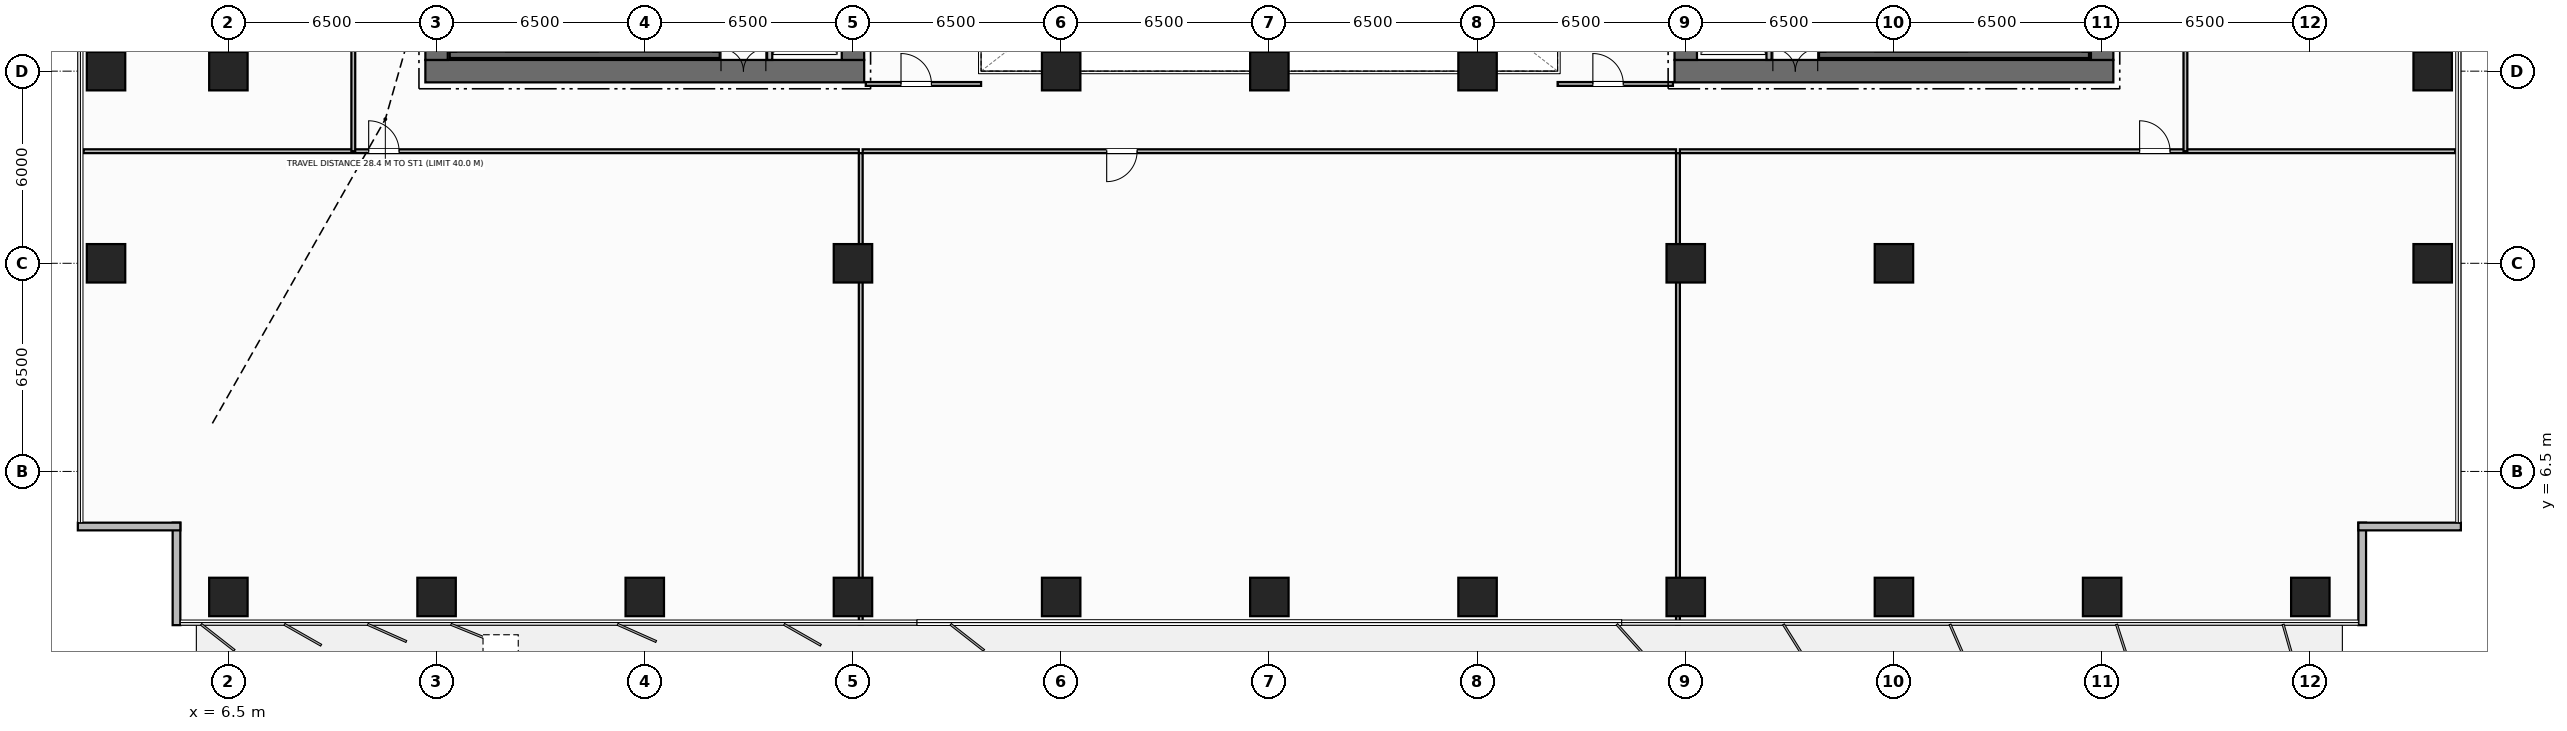
"""IFC4 building model, lengths in metres.
Left out: names, types, materials, properties, quantities, classifications, styles, units other than length and angle.
Written with IfcOpenShell. Run it as: python <this file> out.ifc"""

import sys

from ifc_helpers import new_model, si_unit, direction, frame, frame_2d, origin, origin_2d, place, context, subcontext, project, spatial, rectangle, extrude, element, fill, save


model = new_model("IFC4")
c1 = context("Model", 3, precision=1e-05, world=origin(), true_north=direction((0.0, 1.0)))
c2 = subcontext(c1, "Body", "Model", "MODEL_VIEW")
j1 = project(units=[si_unit("LENGTHUNIT", "METRE"), si_unit("PLANEANGLEUNIT", "RADIAN")], contexts=[c1])
p1 = place(None, origin())
s1 = spatial("IfcSite", under=j1, at=p1, CompositionType="ELEMENT")
p2 = place(p1, origin())
s2 = spatial("IfcBuilding", under=s1, at=p2, CompositionType="ELEMENT")
p3 = place(p2, frame((0.0, 0.0, 86.0)))
s3 = spatial("IfcBuildingStorey", under=s2, at=p3, CompositionType="ELEMENT", Elevation=86.0)
p4 = place(p3, frame((12.65, 19.0, 0.0), z_axis=(0.0, 0.0, 1.0), x_axis=(1.0, 0.0, 0.0)))
e1 = element("IfcWall", 1, at=p4, inside=s3, PredefinedType="SHEAR", context=c2, shape_type="SweptSolid", body=[
    extrude(rectangle(XDim=13.7, YDim=0.7, at=frame_2d((6.85, 0.0))), origin(), (0.0, 0.0, 1.0), 3.8),
])
p5 = place(p4, frame((9.23, 0.0, 0.0)))
e2 = element("IfcOpeningElement", 2, at=p5, cuts=e1, PredefinedType="OPENING", context=c2, shape_type="SweptSolid", body=[
    extrude(rectangle(XDim=1.4, YDim=2.2, at=frame_2d((0.7, 1.1))), frame((0.0, 0.36, 0.0), z_axis=(0.0, -1.0, 0.0), x_axis=(1.0, 0.0, 0.0)), (0.0, 0.0, 1.0), 0.72),
])
p6 = place(p3, frame((13.0, 19.35, 0.0), z_axis=(0.0, 0.0, 1.0), x_axis=(0.0, 1.0, 0.0)))
e3 = element("IfcWall", 3, at=p6, inside=s3, PredefinedType="SHEAR", context=c2, shape_type="SweptSolid", body=[
    extrude(rectangle(XDim=13.3, YDim=0.7, at=frame_2d((6.65, 0.0))), origin(), (0.0, 0.0, 1.0), 3.8),
])
p7 = place(p6, frame((4.7, 0.0, 0.0)))
e4 = element("IfcOpeningElement", 4, at=p7, cuts=e3, PredefinedType="OPENING", context=c2, shape_type="SweptSolid", body=[
    extrude(rectangle(XDim=1.4, YDim=2.2, at=frame_2d((0.7, 1.1))), frame((0.0, 0.36, 0.0), z_axis=(0.0, -1.0, 0.0), x_axis=(1.0, 0.0, 0.0)), (0.0, 0.0, 1.0), 0.72),
])
p8 = place(p3, frame((26.0, 19.35, 0.0), z_axis=(0.0, 0.0, 1.0), x_axis=(0.0, 1.0, 0.0)))
e5 = element("IfcWall", 5, at=p8, inside=s3, PredefinedType="SHEAR", context=c2, shape_type="SweptSolid", body=[
    extrude(rectangle(XDim=13.3, YDim=0.7, at=frame_2d((6.65, 0.0))), origin(), (0.0, 0.0, 1.0), 3.8),
])
p9 = place(p3, frame((51.65, 19.0, 0.0), z_axis=(0.0, 0.0, 1.0), x_axis=(1.0, 0.0, 0.0)))
e6 = element("IfcWall", 6, at=p9, inside=s3, PredefinedType="SHEAR", context=c2, shape_type="SweptSolid", body=[
    extrude(rectangle(XDim=13.7, YDim=0.7, at=frame_2d((6.85, 0.0))), origin(), (0.0, 0.0, 1.0), 3.8),
])
p10 = place(p9, frame((3.07, 0.0, 0.0)))
e7 = element("IfcOpeningElement", 7, at=p10, cuts=e6, PredefinedType="OPENING", context=c2, shape_type="SweptSolid", body=[
    extrude(rectangle(XDim=1.4, YDim=2.2, at=frame_2d((0.7, 1.1))), frame((0.0, 0.36, 0.0), z_axis=(0.0, -1.0, 0.0), x_axis=(1.0, 0.0, 0.0)), (0.0, 0.0, 1.0), 0.72),
])
p11 = place(p3, frame((52.0, 19.35, 0.0), z_axis=(0.0, 0.0, 1.0), x_axis=(0.0, 1.0, 0.0)))
e8 = element("IfcWall", 8, at=p11, inside=s3, PredefinedType="SHEAR", context=c2, shape_type="SweptSolid", body=[
    extrude(rectangle(XDim=13.3, YDim=0.7, at=frame_2d((6.65, 0.0))), origin(), (0.0, 0.0, 1.0), 3.8),
])
p12 = place(p3, frame((65.0, 19.35, 0.0), z_axis=(0.0, 0.0, 1.0), x_axis=(0.0, 1.0, 0.0)))
e9 = element("IfcWall", 9, at=p12, inside=s3, PredefinedType="SHEAR", context=c2, shape_type="SweptSolid", body=[
    extrude(rectangle(XDim=13.3, YDim=0.7, at=frame_2d((6.65, 0.0))), origin(), (0.0, 0.0, 1.0), 3.8),
])
p13 = place(p12, frame((8.1, 0.0, 0.0)))
e10 = element("IfcOpeningElement", 10, at=p13, cuts=e9, PredefinedType="OPENING", context=c2, shape_type="SweptSolid", body=[
    extrude(rectangle(XDim=1.3, YDim=2.2, at=frame_2d((0.65, 1.1))), frame((0.0, 0.36, 0.0), z_axis=(0.0, -1.0, 0.0), x_axis=(1.0, 0.0, 0.0)), (0.0, 0.0, 1.0), 0.72),
])
for number, where, z_axis, x_axis in (
    (11, (13.41, 19.51, 0.0), (0.0, 0.0, 1.0), (1.0, 0.0, 0.0)),
    (12, (56.16, 19.51, 0.0), (0.0, 0.0, 1.0), (1.0, 0.0, 0.0)),
):
    element("IfcWall", number, at=place(p3, frame(where, z_axis=z_axis, x_axis=x_axis)), inside=s3, PredefinedType="SHEAR", context=c2, shape_type="SweptSolid", body=[
        extrude(rectangle(XDim=8.43, YDim=0.2, at=frame_2d((4.215, 0.0))), origin(), (0.0, 0.0, 1.0), 3.8),
    ])
for number, where, z_axis, x_axis in (
    (13, (58.5, 13.0, 0.0), (0.0, 0.0, 1.0), (1.0, 0.0, 0.0)),
    (14, (6.5, 19.0, 0.0), (0.0, 0.0, 1.0), (1.0, 0.0, 0.0)),
    (15, (32.5, 19.0, 0.0), (0.0, 0.0, 1.0), (1.0, 0.0, 0.0)),
    (16, (39.0, 19.0, 0.0), (0.0, 0.0, 1.0), (1.0, 0.0, 0.0)),
    (17, (45.5, 19.0, 0.0), (0.0, 0.0, 1.0), (1.0, 0.0, 0.0)),
    (18, (26.0, 13.0, 0.0), (0.0, 0.0, 1.0), (1.0, 0.0, 0.0)),
    (19, (52.0, 13.0, 0.0), (0.0, 0.0, 1.0), (1.0, 0.0, 0.0)),
    (20, (6.5, 2.58, 0.0), (0.0, 0.0, 1.0), (1.0, 0.0, 0.0)),
    (21, (13.0, 2.58, 0.0), (0.0, 0.0, 1.0), (1.0, 0.0, 0.0)),
    (22, (19.5, 2.58, 0.0), (0.0, 0.0, 1.0), (1.0, 0.0, 0.0)),
    (23, (26.0, 2.58, 0.0), (0.0, 0.0, 1.0), (1.0, 0.0, 0.0)),
    (24, (32.5, 2.58, 0.0), (0.0, 0.0, 1.0), (1.0, 0.0, 0.0)),
    (25, (39.0, 2.58, 0.0), (0.0, 0.0, 1.0), (1.0, 0.0, 0.0)),
    (26, (45.5, 2.58, 0.0), (0.0, 0.0, 1.0), (1.0, 0.0, 0.0)),
    (27, (52.0, 2.58, 0.0), (0.0, 0.0, 1.0), (1.0, 0.0, 0.0)),
    (28, (58.5, 2.58, 0.0), (0.0, 0.0, 1.0), (1.0, 0.0, 0.0)),
    (29, (65.0, 2.58, 0.0), (0.0, 0.0, 1.0), (1.0, 0.0, 0.0)),
    (30, (71.5, 2.58, 0.0), (0.0, 0.0, 1.0), (1.0, 0.0, 0.0)),
    (31, (2.68, 13.0, 0.0), (0.0, 0.0, 1.0), (1.0, 0.0, 0.0)),
    (32, (75.32, 13.0, 0.0), (0.0, 0.0, 1.0), (1.0, 0.0, 0.0)),
    (33, (2.68, 19.0, 0.0), (0.0, 0.0, 1.0), (1.0, 0.0, 0.0)),
    (34, (75.32, 19.0, 0.0), (0.0, 0.0, 1.0), (1.0, 0.0, 0.0)),
):
    element("IfcColumn", number, at=place(p3, frame(where, z_axis=z_axis, x_axis=x_axis)), inside=s3, PredefinedType="COLUMN", context=c2, shape_type="SweptSolid", body=[
        extrude(rectangle(XDim=1.2, YDim=1.2, at=origin_2d()), origin(), (0.0, 0.0, 1.0), 3.8),
    ])
for number, where, z_axis, x_axis in (
    (35, (4.88, 1.7, 0.0), (0.0, 0.0, 1.0), (0.0, 1.0, 0.0)),
    (36, (5.0, 4.78, 0.0), (0.0, 0.0, 1.0), (-1.0, 0.0, 0.0)),
    (37, (73.12, 4.9, 0.0), (0.0, 0.0, 1.0), (0.0, -1.0, 0.0)),
    (38, (76.2, 4.78, 0.0), (0.0, 0.0, 1.0), (-1.0, 0.0, 0.0)),
):
    element("IfcWall", number, at=place(p3, frame(where, z_axis=z_axis, x_axis=x_axis)), inside=s3, PredefinedType="STANDARD", context=c2, shape_type="SweptSolid", body=[
        extrude(rectangle(XDim=3.2, YDim=0.24, at=frame_2d((1.6, 0.0))), origin(), (0.0, 0.0, 1.0), 3.565),
    ])
p14 = place(p3, frame((23.4, 19.35, 0.0), z_axis=(0.0, 0.0, 1.0), x_axis=(0.0, 1.0, 0.0)))
e39 = element("IfcWall", 39, at=p14, inside=s3, PredefinedType="STANDARD", context=c2, shape_type="SweptSolid", body=[
    extrude(rectangle(XDim=13.3, YDim=0.16, at=frame_2d((6.65, 0.0))), origin(), (0.0, 0.0, 1.0), 3.565),
])
p15 = place(p14, frame((0.6, 0.0, 0.0)))
e40 = element("IfcOpeningElement", 40, at=p15, cuts=e39, PredefinedType="OPENING", context=c2, shape_type="SweptSolid", body=[
    extrude(rectangle(XDim=1.1, YDim=2.2, at=frame_2d((0.55, 1.1))), frame((0.0, 0.09, 0.0), z_axis=(0.0, -1.0, 0.0), x_axis=(1.0, 0.0, 0.0)), (0.0, 0.0, 1.0), 0.18),
])
p16 = place(p14, frame((2.75, 0.0, 0.0)))
e41 = element("IfcOpeningElement", 41, at=p16, cuts=e39, PredefinedType="OPENING", context=c2, shape_type="SweptSolid", body=[
    extrude(rectangle(XDim=1.1, YDim=2.2, at=frame_2d((0.55, 1.1))), frame((0.0, 0.09, 0.0), z_axis=(0.0, -1.0, 0.0), x_axis=(1.0, 0.0, 0.0)), (0.0, 0.0, 1.0), 0.18),
])
p17 = place(p14, frame((4.95, 0.0, 0.0)))
e42 = element("IfcOpeningElement", 42, at=p17, cuts=e39, PredefinedType="OPENING", context=c2, shape_type="SweptSolid", body=[
    extrude(rectangle(XDim=1.1, YDim=2.2, at=frame_2d((0.55, 1.1))), frame((0.0, 0.09, 0.0), z_axis=(0.0, -1.0, 0.0), x_axis=(1.0, 0.0, 0.0)), (0.0, 0.0, 1.0), 0.18),
])
p18 = place(p14, frame((7.1, 0.0, 0.0)))
e43 = element("IfcOpeningElement", 43, at=p18, cuts=e39, PredefinedType="OPENING", context=c2, shape_type="SweptSolid", body=[
    extrude(rectangle(XDim=1.1, YDim=2.2, at=frame_2d((0.55, 1.1))), frame((0.0, 0.09, 0.0), z_axis=(0.0, -1.0, 0.0), x_axis=(1.0, 0.0, 0.0)), (0.0, 0.0, 1.0), 0.18),
])
p19 = place(p3, frame((54.6, 19.35, 0.0), z_axis=(0.0, 0.0, 1.0), x_axis=(0.0, 1.0, 0.0)))
e44 = element("IfcWall", 44, at=p19, inside=s3, PredefinedType="STANDARD", context=c2, shape_type="SweptSolid", body=[
    extrude(rectangle(XDim=13.3, YDim=0.16, at=frame_2d((6.65, 0.0))), origin(), (0.0, 0.0, 1.0), 3.565),
])
p20 = place(p19, frame((0.6, 0.0, 0.0)))
e45 = element("IfcOpeningElement", 45, at=p20, cuts=e44, PredefinedType="OPENING", context=c2, shape_type="SweptSolid", body=[
    extrude(rectangle(XDim=1.1, YDim=2.2, at=frame_2d((0.55, 1.1))), frame((0.0, 0.09, 0.0), z_axis=(0.0, -1.0, 0.0), x_axis=(1.0, 0.0, 0.0)), (0.0, 0.0, 1.0), 0.18),
])
p21 = place(p19, frame((2.75, 0.0, 0.0)))
e46 = element("IfcOpeningElement", 46, at=p21, cuts=e44, PredefinedType="OPENING", context=c2, shape_type="SweptSolid", body=[
    extrude(rectangle(XDim=1.1, YDim=2.2, at=frame_2d((0.55, 1.1))), frame((0.0, 0.09, 0.0), z_axis=(0.0, -1.0, 0.0), x_axis=(1.0, 0.0, 0.0)), (0.0, 0.0, 1.0), 0.18),
])
p22 = place(p19, frame((4.95, 0.0, 0.0)))
e47 = element("IfcOpeningElement", 47, at=p22, cuts=e44, PredefinedType="OPENING", context=c2, shape_type="SweptSolid", body=[
    extrude(rectangle(XDim=1.1, YDim=2.2, at=frame_2d((0.55, 1.1))), frame((0.0, 0.09, 0.0), z_axis=(0.0, -1.0, 0.0), x_axis=(1.0, 0.0, 0.0)), (0.0, 0.0, 1.0), 0.18),
])
p23 = place(p19, frame((7.1, 0.0, 0.0)))
e48 = element("IfcOpeningElement", 48, at=p23, cuts=e44, PredefinedType="OPENING", context=c2, shape_type="SweptSolid", body=[
    extrude(rectangle(XDim=1.1, YDim=2.2, at=frame_2d((0.55, 1.1))), frame((0.0, 0.09, 0.0), z_axis=(0.0, -1.0, 0.0), x_axis=(1.0, 0.0, 0.0)), (0.0, 0.0, 1.0), 0.18),
])
p24 = place(p3, frame((26.4, 18.6, 0.0), z_axis=(0.0, 0.0, 1.0), x_axis=(1.0, 0.0, 0.0)))
e49 = element("IfcWall", 49, at=p24, inside=s3, PredefinedType="PARTITIONING", context=c2, shape_type="SweptSolid", body=[
    extrude(rectangle(XDim=3.6, YDim=0.12, at=frame_2d((1.8, 0.0))), origin(), (0.0, 0.0, 1.0), 3.565),
])
p25 = place(p24, frame((1.1, 0.0, 0.0)))
e50 = element("IfcOpeningElement", 50, at=p25, cuts=e49, PredefinedType="OPENING", context=c2, shape_type="SweptSolid", body=[
    extrude(rectangle(XDim=0.95, YDim=2.15, at=frame_2d((0.475, 1.075))), frame((0.0, 0.07, 0.0), z_axis=(0.0, -1.0, 0.0), x_axis=(1.0, 0.0, 0.0)), (0.0, 0.0, 1.0), 0.14),
])
p26 = place(p3, frame((48.0, 18.6, 0.0), z_axis=(0.0, 0.0, 1.0), x_axis=(1.0, 0.0, 0.0)))
e51 = element("IfcWall", 51, at=p26, inside=s3, PredefinedType="PARTITIONING", context=c2, shape_type="SweptSolid", body=[
    extrude(rectangle(XDim=3.6, YDim=0.12, at=frame_2d((1.8, 0.0))), origin(), (0.0, 0.0, 1.0), 3.565),
])
p27 = place(p26, frame((1.1, 0.0, 0.0)))
e52 = element("IfcOpeningElement", 52, at=p27, cuts=e51, PredefinedType="OPENING", context=c2, shape_type="SweptSolid", body=[
    extrude(rectangle(XDim=0.95, YDim=2.15, at=frame_2d((0.475, 1.075))), frame((0.0, 0.07, 0.0), z_axis=(0.0, -1.0, 0.0), x_axis=(1.0, 0.0, 0.0)), (0.0, 0.0, 1.0), 0.14),
])
p28 = place(p3, frame((26.243, 1.72, 0.0), z_axis=(0.0, 0.0, 1.0), x_axis=(0.0, 1.0, 0.0)))
e53 = element("IfcWall", 53, at=p28, inside=s3, PredefinedType="PARTITIONING", context=c2, shape_type="SweptSolid", body=[
    extrude(rectangle(XDim=14.72, YDim=0.12, at=frame_2d((7.36, 0.0))), origin(), (0.0, 0.0, 1.0), 3.565),
])
p29 = place(p3, frame((1.98, 16.5, 0.0), z_axis=(0.0, 0.0, 1.0), x_axis=(1.0, 0.0, 0.0)))
e54 = element("IfcWall", 54, at=p29, inside=s3, PredefinedType="PARTITIONING", context=c2, shape_type="SweptSolid", body=[
    extrude(rectangle(XDim=24.203, YDim=0.12, at=frame_2d((12.102, 0.0))), origin(), (0.0, 0.0, 1.0), 3.565),
])
p30 = place(p29, frame((8.9, 0.0, 0.0)))
e55 = element("IfcOpeningElement", 55, at=p30, cuts=e54, PredefinedType="OPENING", context=c2, shape_type="SweptSolid", body=[
    extrude(rectangle(XDim=0.95, YDim=2.15, at=frame_2d((0.475, 1.075))), frame((0.0, 0.07, 0.0), z_axis=(0.0, -1.0, 0.0), x_axis=(1.0, 0.0, 0.0)), (0.0, 0.0, 1.0), 0.14),
])
p31 = place(p3, frame((51.757, 1.72, 0.0), z_axis=(0.0, 0.0, 1.0), x_axis=(0.0, 1.0, 0.0)))
e56 = element("IfcWall", 56, at=p31, inside=s3, PredefinedType="PARTITIONING", context=c2, shape_type="SweptSolid", body=[
    extrude(rectangle(XDim=14.72, YDim=0.12, at=frame_2d((7.36, 0.0))), origin(), (0.0, 0.0, 1.0), 3.565),
])
p32 = place(p3, frame((26.303, 16.5, 0.0), z_axis=(0.0, 0.0, 1.0), x_axis=(1.0, 0.0, 0.0)))
e57 = element("IfcWall", 57, at=p32, inside=s3, PredefinedType="PARTITIONING", context=c2, shape_type="SweptSolid", body=[
    extrude(rectangle(XDim=25.394, YDim=0.12, at=frame_2d((12.697, 0.0))), origin(), (0.0, 0.0, 1.0), 3.565),
])
p33 = place(p32, frame((7.618, 0.0, 0.0)))
e58 = element("IfcOpeningElement", 58, at=p33, cuts=e57, PredefinedType="OPENING", context=c2, shape_type="SweptSolid", body=[
    extrude(rectangle(XDim=0.95, YDim=2.15, at=frame_2d((0.475, 1.075))), frame((0.0, 0.07, 0.0), z_axis=(0.0, -1.0, 0.0), x_axis=(1.0, 0.0, 0.0)), (0.0, 0.0, 1.0), 0.14),
])
p34 = place(p3, frame((51.817, 16.5, 0.0), z_axis=(0.0, 0.0, 1.0), x_axis=(1.0, 0.0, 0.0)))
e59 = element("IfcWall", 59, at=p34, inside=s3, PredefinedType="PARTITIONING", context=c2, shape_type="SweptSolid", body=[
    extrude(rectangle(XDim=24.203, YDim=0.12, at=frame_2d((12.102, 0.0))), origin(), (0.0, 0.0, 1.0), 3.565),
])
p35 = place(p34, frame((14.353, 0.0, 0.0)))
e60 = element("IfcOpeningElement", 60, at=p35, cuts=e59, PredefinedType="OPENING", context=c2, shape_type="SweptSolid", body=[
    extrude(rectangle(XDim=0.95, YDim=2.15, at=frame_2d((0.475, 1.075))), frame((0.0, 0.07, 0.0), z_axis=(0.0, -1.0, 0.0), x_axis=(1.0, 0.0, 0.0)), (0.0, 0.0, 1.0), 0.14),
])
p36 = place(p3, frame((10.4, 16.5, 0.0), z_axis=(0.0, 0.0, 1.0), x_axis=(0.0, 1.0, 0.0)))
e61 = element("IfcWall", 61, at=p36, inside=s3, PredefinedType="PARTITIONING", context=c2, shape_type="SweptSolid", body=[
    extrude(rectangle(XDim=6.333, YDim=0.12, at=frame_2d((3.167, 0.0))), origin(), (0.0, 0.0, 1.0), 3.565),
])
p37 = place(p36, frame((3.742, 0.0, 0.0)))
e62 = element("IfcOpeningElement", 62, at=p37, cuts=e61, PredefinedType="OPENING", context=c2, shape_type="SweptSolid", body=[
    extrude(rectangle(XDim=0.95, YDim=2.15, at=frame_2d((0.475, 1.075))), frame((0.0, 0.07, 0.0), z_axis=(0.0, -1.0, 0.0), x_axis=(1.0, 0.0, 0.0)), (0.0, 0.0, 1.0), 0.14),
])
p38 = place(p3, frame((67.6, 16.5, 0.0), z_axis=(0.0, 0.0, 1.0), x_axis=(0.0, 1.0, 0.0)))
e63 = element("IfcWall", 63, at=p38, inside=s3, PredefinedType="PARTITIONING", context=c2, shape_type="SweptSolid", body=[
    extrude(rectangle(XDim=19.0, YDim=0.12, at=frame_2d((9.5, 0.0))), origin(), (0.0, 0.0, 1.0), 3.565),
])
p39 = place(p38, frame((9.025, 0.0, 0.0)))
e64 = element("IfcOpeningElement", 64, at=p39, cuts=e63, PredefinedType="OPENING", context=c2, shape_type="SweptSolid", body=[
    extrude(rectangle(XDim=0.95, YDim=2.15, at=frame_2d((0.475, 1.075))), frame((0.0, 0.07, 0.0), z_axis=(0.0, -1.0, 0.0), x_axis=(1.0, 0.0, 0.0)), (0.0, 0.0, 1.0), 0.14),
])
p40 = place(p3, frame((0.0, 0.0, -0.21)))
p41 = place(p40, frame((15.0, 0.85, 0.0)))
p42 = place(p41, frame((0.0, 0.0, 0.21)))
e65 = element("IfcDoor", 65, at=p42, inside=s3, OperationType="SINGLE_SWING_LEFT", PredefinedType="TRAPDOOR", context=c2, shape_type="SweptSolid", body=[
    extrude(rectangle(XDim=1.1, YDim=1.1, at=origin_2d()), origin(), (0.0, 0.0, 1.0), 0.05),
])
p43 = place(p5, origin())
e66 = element("IfcDoor", 66, at=p43, inside=s3, OperationType="DOUBLE_DOOR_SINGLE_SWING", PredefinedType="DOOR", context=c2, shape_type="SweptSolid", body=[
    extrude(rectangle(XDim=1.4, YDim=2.2, at=frame_2d((0.7, 1.1))), frame((0.0, 0.125, 0.0), z_axis=(0.0, -1.0, 0.0), x_axis=(1.0, 0.0, 0.0)), (0.0, 0.0, 1.0), 0.05),
])
fill(e2, e66)
p44 = place(p10, origin())
e67 = element("IfcDoor", 67, at=p44, inside=s3, OperationType="DOUBLE_DOOR_SINGLE_SWING", PredefinedType="DOOR", context=c2, shape_type="SweptSolid", body=[
    extrude(rectangle(XDim=1.4, YDim=2.2, at=frame_2d((0.7, 1.1))), frame((0.0, 0.125, 0.0), z_axis=(0.0, -1.0, 0.0), x_axis=(1.0, 0.0, 0.0)), (0.0, 0.0, 1.0), 0.05),
])
fill(e7, e67)
p45 = place(p25, origin())
e68 = element("IfcDoor", 68, at=p45, inside=s3, OperationType="SINGLE_SWING_LEFT", PredefinedType="DOOR", context=c2, shape_type="SweptSolid", body=[
    extrude(rectangle(XDim=0.95, YDim=2.15, at=frame_2d((0.475, 1.075))), frame((0.0, 0.025, 0.0), z_axis=(0.0, -1.0, 0.0), x_axis=(1.0, 0.0, 0.0)), (0.0, 0.0, 1.0), 0.05),
])
fill(e50, e68)
p46 = place(p27, origin())
e69 = element("IfcDoor", 69, at=p46, inside=s3, OperationType="SINGLE_SWING_LEFT", PredefinedType="DOOR", context=c2, shape_type="SweptSolid", body=[
    extrude(rectangle(XDim=0.95, YDim=2.15, at=frame_2d((0.475, 1.075))), frame((0.0, 0.025, 0.0), z_axis=(0.0, -1.0, 0.0), x_axis=(1.0, 0.0, 0.0)), (0.0, 0.0, 1.0), 0.05),
])
fill(e52, e69)
p47 = place(p30, origin())
e70 = element("IfcDoor", 70, at=p47, inside=s3, OperationType="SINGLE_SWING_LEFT", PredefinedType="DOOR", context=c2, shape_type="SweptSolid", body=[
    extrude(rectangle(XDim=0.95, YDim=2.15, at=frame_2d((0.475, 1.075))), frame((0.0, 0.025, 0.0), z_axis=(0.0, -1.0, 0.0), x_axis=(1.0, 0.0, 0.0)), (0.0, 0.0, 1.0), 0.05),
])
fill(e55, e70)
p48 = place(p33, origin())
e71 = element("IfcDoor", 71, at=p48, inside=s3, OperationType="SINGLE_SWING_RIGHT", PredefinedType="DOOR", context=c2, shape_type="SweptSolid", body=[
    extrude(rectangle(XDim=0.95, YDim=2.15, at=frame_2d((0.475, 1.075))), frame((0.0, 0.025, 0.0), z_axis=(0.0, -1.0, 0.0), x_axis=(1.0, 0.0, 0.0)), (0.0, 0.0, 1.0), 0.05),
])
fill(e58, e71)
p49 = place(p35, origin())
e72 = element("IfcDoor", 72, at=p49, inside=s3, OperationType="SINGLE_SWING_LEFT", PredefinedType="DOOR", context=c2, shape_type="SweptSolid", body=[
    extrude(rectangle(XDim=0.95, YDim=2.15, at=frame_2d((0.475, 1.075))), frame((0.0, 0.025, 0.0), z_axis=(0.0, -1.0, 0.0), x_axis=(1.0, 0.0, 0.0)), (0.0, 0.0, 1.0), 0.05),
])
fill(e60, e72)
save(model, sys.argv[1])
